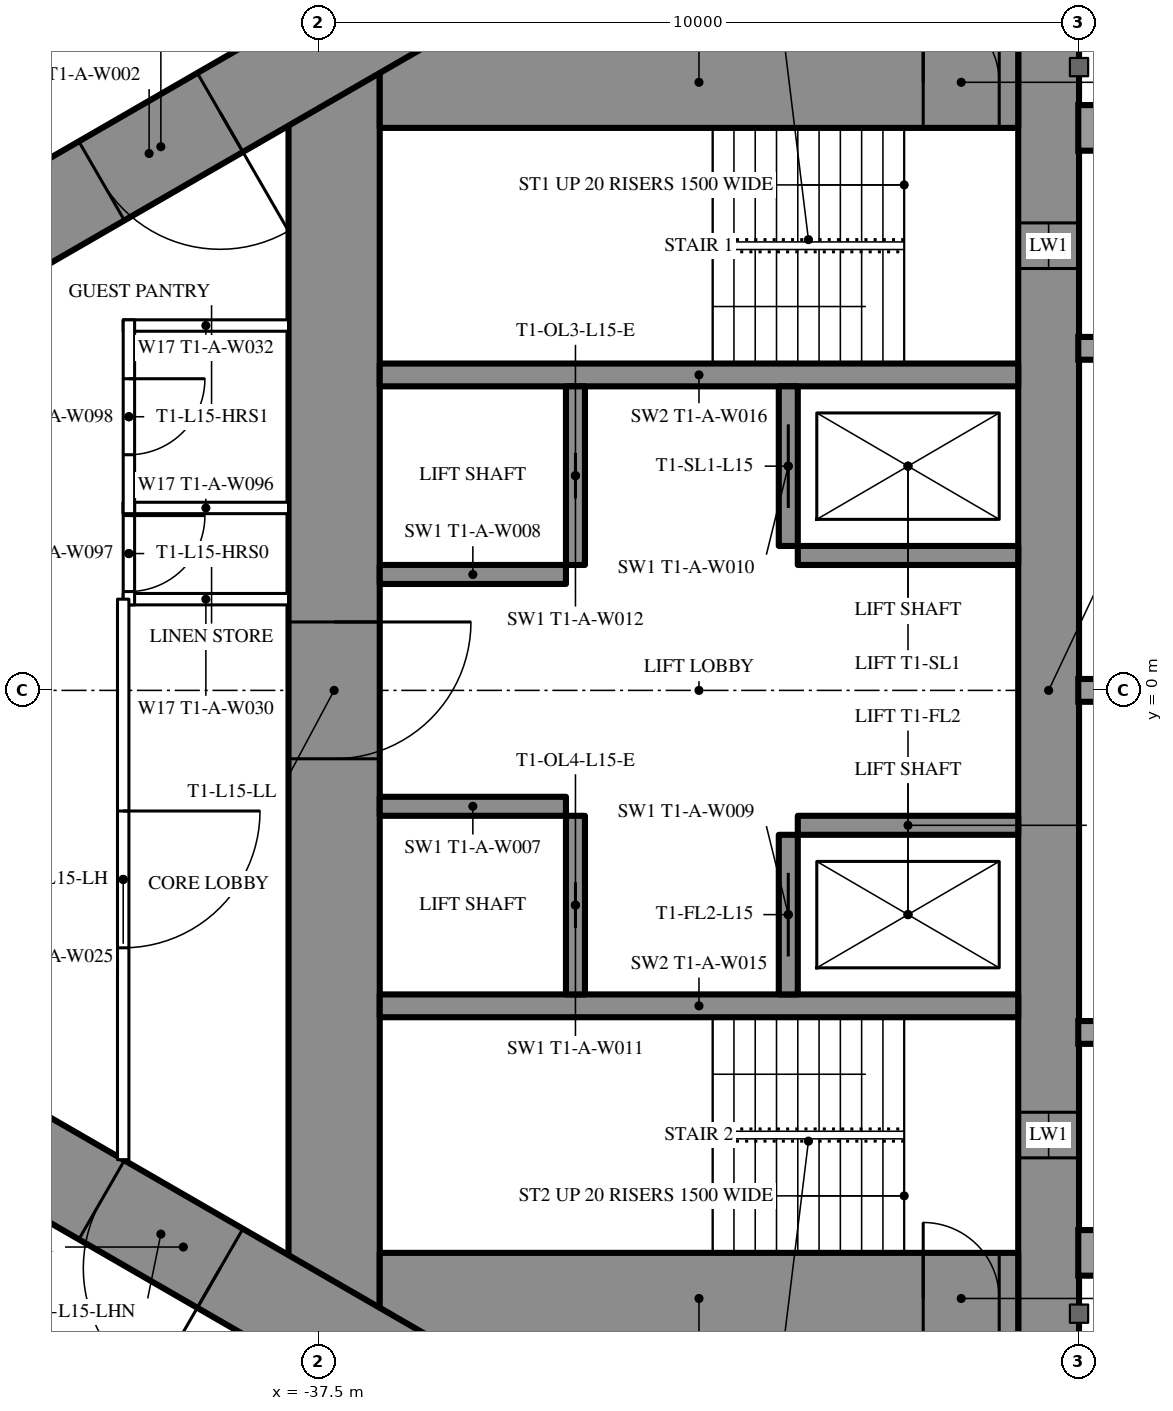
"""IFC4 building model, lengths in metres.
Left out: names, types, materials, properties, quantities, classifications, styles, units other than length and angle.
Written with IfcOpenShell. Run it as: python <this file> out.ifc"""

import sys

from ifc_helpers import new_model, si_unit, direction, frame, frame_2d, origin, place, context, subcontext, project, spatial, rectangle, extrude, element, fill, save


model = new_model("IFC4")
c1 = context("Model", 3, precision=1e-05, world=origin(), true_north=direction((0.0, 1.0)))
c2 = subcontext(c1, "Body", "Model", "MODEL_VIEW")
j1 = project(units=[si_unit("LENGTHUNIT", "METRE"), si_unit("PLANEANGLEUNIT", "RADIAN")], contexts=[c1])
p1 = place(None, origin())
s1 = spatial("IfcSite", under=j1, at=p1, CompositionType="ELEMENT")
p2 = place(p1, origin())
s2 = spatial("IfcBuilding", under=s1, at=p2, CompositionType="ELEMENT")
p3 = place(p2, frame((0.0, 0.0, 60.0)))
s3 = spatial("IfcBuildingStorey", under=s2, at=p3, CompositionType="ELEMENT", Elevation=60.0)
p4 = place(p3, frame((-27.9, 8.6, 0.0), z_axis=(0.0, 0.0, 1.0), x_axis=(0.0, -1.0, 0.0)))
e1 = element("IfcWall", 1, at=p4, inside=s3, PredefinedType="SHEAR", context=c2, shape_type="SweptSolid", body=[
    extrude(rectangle(XDim=17.2, YDim=0.8, at=frame_2d((8.6, 0.0))), origin(), (0.0, 0.0, 1.0), 3.5),
])
p5 = place(p4, frame((2.45, 0.0, 0.6)))
e2 = element("IfcOpeningElement", 2, at=p5, cuts=e1, PredefinedType="OPENING", context=c2, shape_type="SweptSolid", body=[
    extrude(rectangle(XDim=0.6, YDim=2.1, at=frame_2d((0.3, 1.05))), frame((0.0, 0.41, 0.0), z_axis=(0.0, -1.0, 0.0), x_axis=(1.0, 0.0, 0.0)), (0.0, 0.0, 1.0), 0.82),
])
p6 = place(p4, frame((14.15, 0.0, 0.6)))
e3 = element("IfcOpeningElement", 3, at=p6, cuts=e1, PredefinedType="OPENING", context=c2, shape_type="SweptSolid", body=[
    extrude(rectangle(XDim=0.6, YDim=2.1, at=frame_2d((0.3, 1.05))), frame((0.0, 0.41, 0.0), z_axis=(0.0, -1.0, 0.0), x_axis=(1.0, 0.0, 0.0)), (0.0, 0.0, 1.0), 0.82),
])
p7 = place(p3, frame((-37.3, 8.6, 0.0), z_axis=(0.0, 0.0, 1.0), x_axis=(0.0, -1.0, 0.0)))
e4 = element("IfcWall", 4, at=p7, inside=s3, PredefinedType="SHEAR", context=c2, shape_type="SweptSolid", body=[
    extrude(rectangle(XDim=17.2, YDim=1.2, at=frame_2d((8.6, 0.0))), origin(), (0.0, 0.0, 1.0), 3.5),
])
p8 = place(p7, frame((7.7, 0.0, 0.0)))
e5 = element("IfcOpeningElement", 5, at=p8, cuts=e4, PredefinedType="OPENING", context=c2, shape_type="SweptSolid", body=[
    extrude(rectangle(XDim=1.8, YDim=2.2, at=frame_2d((0.9, 1.1))), frame((0.0, 0.61, 0.0), z_axis=(0.0, -1.0, 0.0), x_axis=(1.0, 0.0, 0.0)), (0.0, 0.0, 1.0), 1.22),
])
p9 = place(p3, frame((-28.3, 8.0, 0.0), z_axis=(0.0, 0.0, 1.0), x_axis=(-1.0, 0.0, 0.0)))
e6 = element("IfcWall", 6, at=p9, inside=s3, PredefinedType="SHEAR", context=c2, shape_type="SweptSolid", body=[
    extrude(rectangle(XDim=8.4, YDim=1.2, at=frame_2d((4.2, 0.0))), origin(), (0.0, 0.0, 1.0), 3.5),
])
p10 = place(p9, frame((0.25, 0.0, 0.0)))
e7 = element("IfcOpeningElement", 7, at=p10, cuts=e6, PredefinedType="OPENING", context=c2, shape_type="SweptSolid", body=[
    extrude(rectangle(XDim=1.0, YDim=2.2, at=frame_2d((0.5, 1.1))), frame((0.0, 0.61, 0.0), z_axis=(0.0, -1.0, 0.0), x_axis=(1.0, 0.0, 0.0)), (0.0, 0.0, 1.0), 1.22),
])
p11 = place(p3, frame((-28.3, -8.0, 0.0), z_axis=(0.0, 0.0, 1.0), x_axis=(-1.0, 0.0, 0.0)))
e8 = element("IfcWall", 8, at=p11, inside=s3, PredefinedType="SHEAR", context=c2, shape_type="SweptSolid", body=[
    extrude(rectangle(XDim=8.4, YDim=1.2, at=frame_2d((4.2, 0.0))), origin(), (0.0, 0.0, 1.0), 3.5),
])
p12 = place(p11, frame((0.25, 0.0, 0.0)))
e9 = element("IfcOpeningElement", 9, at=p12, cuts=e8, PredefinedType="OPENING", context=c2, shape_type="SweptSolid", body=[
    extrude(rectangle(XDim=1.0, YDim=2.2, at=frame_2d((0.5, 1.1))), frame((0.0, 0.61, 0.0), z_axis=(0.0, -1.0, 0.0), x_axis=(1.0, 0.0, 0.0)), (0.0, 0.0, 1.0), 1.22),
])
for number, where, z_axis, x_axis in (
    (10, (-28.3, 4.15, 0.0), (0.0, 0.0, 1.0), (-1.0, 0.0, 0.0)),
    (11, (-28.3, -4.15, 0.0), (0.0, 0.0, 1.0), (-1.0, 0.0, 0.0)),
):
    element("IfcWall", number, at=place(p3, frame(where, z_axis=z_axis, x_axis=x_axis)), inside=s3, PredefinedType="SHEAR", context=c2, shape_type="SweptSolid", body=[
        extrude(rectangle(XDim=8.4, YDim=0.3, at=frame_2d((4.2, 0.0))), origin(), (0.0, 0.0, 1.0), 3.5),
    ])
p13 = place(p3, frame((-31.325, 4.0, 0.0), z_axis=(0.0, 0.0, 1.0), x_axis=(0.0, -1.0, 0.0)))
e12 = element("IfcWall", 12, at=p13, inside=s3, PredefinedType="SHEAR", context=c2, shape_type="SweptSolid", body=[
    extrude(rectangle(XDim=2.1, YDim=0.25, at=frame_2d((1.05, 0.0))), origin(), (0.0, 0.0, 1.0), 3.5),
])
p14 = place(p13, frame((0.5, 0.0, 0.0)))
e13 = element("IfcOpeningElement", 13, at=p14, cuts=e12, PredefinedType="OPENING", context=c2, shape_type="SweptSolid", body=[
    extrude(rectangle(XDim=1.1, YDim=2.2, at=frame_2d((0.55, 1.1))), frame((0.0, 0.135, 0.0), z_axis=(0.0, -1.0, 0.0), x_axis=(1.0, 0.0, 0.0)), (0.0, 0.0, 1.0), 0.27),
])
p15 = place(p3, frame((-34.125, 4.0, 0.0), z_axis=(0.0, 0.0, 1.0), x_axis=(0.0, -1.0, 0.0)))
e14 = element("IfcWall", 14, at=p15, inside=s3, PredefinedType="SHEAR", context=c2, shape_type="SweptSolid", body=[
    extrude(rectangle(XDim=2.35, YDim=0.25, at=frame_2d((1.175, 0.0))), origin(), (0.0, 0.0, 1.0), 3.5),
])
p16 = place(p15, frame((0.875, 0.0, 0.0)))
e15 = element("IfcOpeningElement", 15, at=p16, cuts=e14, PredefinedType="OPENING", context=c2, shape_type="SweptSolid", body=[
    extrude(rectangle(XDim=0.6, YDim=2.0, at=frame_2d((0.3, 1.0))), frame((0.0, 0.135, 0.0), z_axis=(0.0, -1.0, 0.0), x_axis=(1.0, 0.0, 0.0)), (0.0, 0.0, 1.0), 0.27),
])
p17 = place(p3, frame((-28.3, 1.775, 0.0), z_axis=(0.0, 0.0, 1.0), x_axis=(-1.0, 0.0, 0.0)))
e16 = element("IfcWall", 16, at=p17, inside=s3, PredefinedType="SHEAR", context=c2, shape_type="SweptSolid", body=[
    extrude(rectangle(XDim=2.9, YDim=0.25, at=frame_2d((1.45, 0.0))), origin(), (0.0, 0.0, 1.0), 3.5),
])
p18 = place(p3, frame((-34.25, 1.525, 0.0), z_axis=(0.0, 0.0, 1.0), x_axis=(-1.0, 0.0, 0.0)))
e17 = element("IfcWall", 17, at=p18, inside=s3, PredefinedType="SHEAR", context=c2, shape_type="SweptSolid", body=[
    extrude(rectangle(XDim=2.45, YDim=0.25, at=frame_2d((1.225, 0.0))), origin(), (0.0, 0.0, 1.0), 3.5),
])
p19 = place(p3, frame((-31.325, -1.9, 0.0), z_axis=(0.0, 0.0, 1.0), x_axis=(0.0, -1.0, 0.0)))
e18 = element("IfcWall", 18, at=p19, inside=s3, PredefinedType="SHEAR", context=c2, shape_type="SweptSolid", body=[
    extrude(rectangle(XDim=2.1, YDim=0.25, at=frame_2d((1.05, 0.0))), origin(), (0.0, 0.0, 1.0), 3.5),
])
p20 = place(p19, frame((0.5, 0.0, 0.0)))
e19 = element("IfcOpeningElement", 19, at=p20, cuts=e18, PredefinedType="OPENING", context=c2, shape_type="SweptSolid", body=[
    extrude(rectangle(XDim=1.1, YDim=2.2, at=frame_2d((0.55, 1.1))), frame((0.0, 0.135, 0.0), z_axis=(0.0, -1.0, 0.0), x_axis=(1.0, 0.0, 0.0)), (0.0, 0.0, 1.0), 0.27),
])
p21 = place(p3, frame((-34.125, -1.65, 0.0), z_axis=(0.0, 0.0, 1.0), x_axis=(0.0, -1.0, 0.0)))
e20 = element("IfcWall", 20, at=p21, inside=s3, PredefinedType="SHEAR", context=c2, shape_type="SweptSolid", body=[
    extrude(rectangle(XDim=2.35, YDim=0.25, at=frame_2d((1.175, 0.0))), origin(), (0.0, 0.0, 1.0), 3.5),
])
p22 = place(p21, frame((0.875, 0.0, 0.0)))
e21 = element("IfcOpeningElement", 21, at=p22, cuts=e20, PredefinedType="OPENING", context=c2, shape_type="SweptSolid", body=[
    extrude(rectangle(XDim=0.6, YDim=2.0, at=frame_2d((0.3, 1.0))), frame((0.0, 0.135, 0.0), z_axis=(0.0, -1.0, 0.0), x_axis=(1.0, 0.0, 0.0)), (0.0, 0.0, 1.0), 0.27),
])
p23 = place(p3, frame((-28.3, -1.775, 0.0), z_axis=(0.0, 0.0, 1.0), x_axis=(-1.0, 0.0, 0.0)))
e22 = element("IfcWall", 22, at=p23, inside=s3, PredefinedType="SHEAR", context=c2, shape_type="SweptSolid", body=[
    extrude(rectangle(XDim=2.9, YDim=0.25, at=frame_2d((1.45, 0.0))), origin(), (0.0, 0.0, 1.0), 3.5),
])
p24 = place(p3, frame((-34.25, -1.525, 0.0), z_axis=(0.0, 0.0, 1.0), x_axis=(-1.0, 0.0, 0.0)))
e23 = element("IfcWall", 23, at=p24, inside=s3, PredefinedType="SHEAR", context=c2, shape_type="SweptSolid", body=[
    extrude(rectangle(XDim=2.45, YDim=0.25, at=frame_2d((1.225, 0.0))), origin(), (0.0, 0.0, 1.0), 3.5),
])
p25 = place(p3, frame((-27.2, 14.3, 0.0), z_axis=(0.0, 0.0, 1.0), x_axis=(-0.866026593062, -0.499997940104, 0.0)))
e24 = element("IfcWall", 24, at=p25, inside=s3, PredefinedType="SHEAR", context=c2, shape_type="SweptSolid", body=[
    extrude(rectangle(XDim=28.946, YDim=1.2, at=frame_2d((14.473, 0.0))), origin(), (0.0, 0.0, 1.0), 3.5),
])
p26 = place(p25, frame((4.6, 0.0, 0.0)))
e25 = element("IfcOpeningElement", 25, at=p26, cuts=e24, PredefinedType="OPENING", context=c2, shape_type="SweptSolid", body=[
    extrude(rectangle(XDim=1.0, YDim=2.2, at=frame_2d((0.5, 1.1))), frame((0.0, 0.61, 0.0), z_axis=(0.0, -1.0, 0.0), x_axis=(1.0, 0.0, 0.0)), (0.0, 0.0, 1.0), 1.22),
])
p27 = place(p25, frame((13.395, 0.0, 0.0)))
e26 = element("IfcOpeningElement", 26, at=p27, cuts=e24, PredefinedType="OPENING", context=c2, shape_type="SweptSolid", body=[
    extrude(rectangle(XDim=1.8, YDim=2.2, at=frame_2d((0.9, 1.1))), frame((0.0, 0.61, 0.0), z_axis=(0.0, -1.0, 0.0), x_axis=(1.0, 0.0, 0.0)), (0.0, 0.0, 1.0), 1.22),
])
p28 = place(p3, frame((-27.2, -14.3, 0.0), z_axis=(0.0, 0.0, 1.0), x_axis=(-0.866024021859, 0.500002393557, 0.0)))
e27 = element("IfcWall", 27, at=p28, inside=s3, PredefinedType="SHEAR", context=c2, shape_type="SweptSolid", body=[
    extrude(rectangle(XDim=27.907, YDim=1.2, at=frame_2d((13.954, 0.0))), origin(), (0.0, 0.0, 1.0), 3.5),
])
p29 = place(p28, frame((4.6, 0.0, 0.0)))
e28 = element("IfcOpeningElement", 28, at=p29, cuts=e27, PredefinedType="OPENING", context=c2, shape_type="SweptSolid", body=[
    extrude(rectangle(XDim=1.0, YDim=2.2, at=frame_2d((0.5, 1.1))), frame((0.0, 0.61, 0.0), z_axis=(0.0, -1.0, 0.0), x_axis=(1.0, 0.0, 0.0)), (0.0, 0.0, 1.0), 1.22),
])
p30 = place(p28, frame((13.395, 0.0, 0.0)))
e29 = element("IfcOpeningElement", 29, at=p30, cuts=e27, PredefinedType="OPENING", context=c2, shape_type="SweptSolid", body=[
    extrude(rectangle(XDim=1.8, YDim=2.2, at=frame_2d((0.9, 1.1))), frame((0.0, 0.61, 0.0), z_axis=(0.0, -1.0, 0.0), x_axis=(1.0, 0.0, 0.0)), (0.0, 0.0, 1.0), 1.22),
])
p31 = place(p3, frame((-37.7, 10.894, 0.0), z_axis=(0.0, 0.0, 1.0), x_axis=(-0.866027905338, -0.499995667157, 0.0)))
e30 = element("IfcWall", 30, at=p31, inside=s3, PredefinedType="PARTITIONING", context=c2, shape_type="SweptSolid", body=[
    extrude(rectangle(XDim=21.787, YDim=0.2, at=frame_2d((10.894, 0.0))), origin(), (0.0, 0.0, 1.0), 3.25),
])
p32 = place(p31, frame((20.237, 0.0, 0.0)))
e31 = element("IfcOpeningElement", 31, at=p32, cuts=e30, PredefinedType="OPENING", context=c2, shape_type="SweptSolid", body=[
    extrude(rectangle(XDim=0.95, YDim=2.2, at=frame_2d((0.475, 1.1))), frame((0.0, 0.11, 0.0), z_axis=(0.0, -1.0, 0.0), x_axis=(1.0, 0.0, 0.0)), (0.0, 0.0, 1.0), 0.22),
])
p33 = place(p31, frame((7.73, 0.0, 0.0)))
e32 = element("IfcOpeningElement", 32, at=p33, cuts=e30, PredefinedType="OPENING", context=c2, shape_type="SweptSolid", body=[
    extrude(rectangle(XDim=0.95, YDim=2.2, at=frame_2d((0.475, 1.1))), frame((0.0, 0.11, 0.0), z_axis=(0.0, -1.0, 0.0), x_axis=(1.0, 0.0, 0.0)), (0.0, 0.0, 1.0), 0.22),
])
p34 = place(p3, frame((-36.92, -11.344, 0.0), z_axis=(0.0, 0.0, 1.0), x_axis=(-0.866028313256, 0.499994960614, 0.0)))
e33 = element("IfcWall", 33, at=p34, inside=s3, PredefinedType="PARTITIONING", context=c2, shape_type="SweptSolid", body=[
    extrude(rectangle(XDim=22.568, YDim=0.2, at=frame_2d((11.284, 0.0))), origin(), (0.0, 0.0, 1.0), 3.25),
])
p35 = place(p34, frame((12.68, 0.0, 0.0)))
e34 = element("IfcOpeningElement", 34, at=p35, cuts=e33, PredefinedType="OPENING", context=c2, shape_type="SweptSolid", body=[
    extrude(rectangle(XDim=0.95, YDim=2.2, at=frame_2d((0.475, 1.1))), frame((0.0, 0.11, 0.0), z_axis=(0.0, -1.0, 0.0), x_axis=(1.0, 0.0, 0.0)), (0.0, 0.0, 1.0), 0.22),
])
p36 = place(p34, frame((3.35, 0.0, 0.0)))
e35 = element("IfcOpeningElement", 35, at=p36, cuts=e33, PredefinedType="OPENING", context=c2, shape_type="SweptSolid", body=[
    extrude(rectangle(XDim=1.0, YDim=2.2, at=frame_2d((0.5, 1.1))), frame((0.0, 0.11, 0.0), z_axis=(0.0, -1.0, 0.0), x_axis=(1.0, 0.0, 0.0)), (0.0, 0.0, 1.0), 0.22),
])
for number, where, z_axis, x_axis in (
    (36, (-37.9, 1.2, 0.0), (0.0, 0.0, 1.0), (-1.0, 0.0, 0.0)),
    (37, (-37.9, 2.4, 0.0), (0.0, 0.0, 1.0), (-1.0, 0.0, 0.0)),
    (38, (-37.9, 4.8, 0.0), (0.0, 0.0, 1.0), (-1.0, 0.0, 0.0)),
):
    element("IfcWall", number, at=place(p3, frame(where, z_axis=z_axis, x_axis=x_axis)), inside=s3, PredefinedType="PARTITIONING", context=c2, shape_type="SweptSolid", body=[
        extrude(rectangle(XDim=2.175, YDim=0.15, at=frame_2d((1.087, 0.0))), origin(), (0.0, 0.0, 1.0), 3.25),
    ])
p37 = place(p3, frame((-40.0, 2.475, 0.0), z_axis=(0.0, 0.0, 1.0), x_axis=(0.0, -1.0, 0.0)))
e39 = element("IfcWall", 39, at=p37, inside=s3, PredefinedType="PARTITIONING", context=c2, shape_type="SweptSolid", body=[
    extrude(rectangle(XDim=1.35, YDim=0.15, at=frame_2d((0.675, 0.0))), origin(), (0.0, 0.0, 1.0), 3.25),
])
p38 = place(p37, frame((0.175, 0.0, 0.0)))
e40 = element("IfcOpeningElement", 40, at=p38, cuts=e39, PredefinedType="OPENING", context=c2, shape_type="SweptSolid", body=[
    extrude(rectangle(XDim=1.0, YDim=2.2, at=frame_2d((0.5, 1.1))), frame((0.0, 0.085, 0.0), z_axis=(0.0, -1.0, 0.0), x_axis=(1.0, 0.0, 0.0)), (0.0, 0.0, 1.0), 0.17),
])
p39 = place(p3, frame((-40.0, 4.875, 0.0), z_axis=(0.0, 0.0, 1.0), x_axis=(0.0, -1.0, 0.0)))
e41 = element("IfcWall", 41, at=p39, inside=s3, PredefinedType="PARTITIONING", context=c2, shape_type="SweptSolid", body=[
    extrude(rectangle(XDim=2.55, YDim=0.15, at=frame_2d((1.275, 0.0))), origin(), (0.0, 0.0, 1.0), 3.25),
])
p40 = place(p39, frame((0.775, 0.0, 0.0)))
e42 = element("IfcOpeningElement", 42, at=p40, cuts=e41, PredefinedType="OPENING", context=c2, shape_type="SweptSolid", body=[
    extrude(rectangle(XDim=1.0, YDim=2.2, at=frame_2d((0.5, 1.1))), frame((0.0, 0.085, 0.0), z_axis=(0.0, -1.0, 0.0), x_axis=(1.0, 0.0, 0.0)), (0.0, 0.0, 1.0), 0.17),
])
p41 = place(p3, frame((-40.075, 1.2, 0.0), z_axis=(0.0, 0.0, 1.0), x_axis=(0.0, -1.0, 0.0)))
e43 = element("IfcWall", 43, at=p41, inside=s3, PredefinedType="PARTITIONING", context=c2, shape_type="SweptSolid", body=[
    extrude(rectangle(XDim=7.374, YDim=0.15, at=frame_2d((3.687, 0.0))), origin(), (0.0, 0.0, 1.0), 3.25),
])
p42 = place(p41, frame((2.787, 0.0, 0.0)))
e44 = element("IfcOpeningElement", 44, at=p42, cuts=e43, PredefinedType="OPENING", context=c2, shape_type="SweptSolid", body=[
    extrude(rectangle(XDim=1.8, YDim=2.2, at=frame_2d((0.9, 1.1))), frame((0.0, 0.085, 0.0), z_axis=(0.0, -1.0, 0.0), x_axis=(1.0, 0.0, 0.0)), (0.0, 0.0, 1.0), 0.17),
])
p43 = place(p38, origin())
e45 = element("IfcDoor", 45, at=p43, inside=s3, OperationType="SINGLE_SWING_LEFT", PredefinedType="DOOR", context=c2, shape_type="SweptSolid", body=[
    extrude(rectangle(XDim=1.0, YDim=2.2, at=frame_2d((0.5, 1.1))), frame((0.0, 0.025, 0.0), z_axis=(0.0, -1.0, 0.0), x_axis=(1.0, 0.0, 0.0)), (0.0, 0.0, 1.0), 0.05),
])
fill(e40, e45)
p44 = place(p40, origin())
e46 = element("IfcDoor", 46, at=p44, inside=s3, OperationType="SINGLE_SWING_LEFT", PredefinedType="DOOR", context=c2, shape_type="SweptSolid", body=[
    extrude(rectangle(XDim=1.0, YDim=2.2, at=frame_2d((0.5, 1.1))), frame((0.0, 0.025, 0.0), z_axis=(0.0, -1.0, 0.0), x_axis=(1.0, 0.0, 0.0)), (0.0, 0.0, 1.0), 0.05),
])
fill(e42, e46)
p45 = place(p42, origin())
e47 = element("IfcDoor", 47, at=p45, inside=s3, OperationType="DOUBLE_DOOR_SINGLE_SWING", PredefinedType="DOOR", context=c2, shape_type="SweptSolid", body=[
    extrude(rectangle(XDim=1.8, YDim=2.2, at=frame_2d((0.9, 1.1))), frame((0.0, 0.025, 0.0), z_axis=(0.0, -1.0, 0.0), x_axis=(1.0, 0.0, 0.0)), (0.0, 0.0, 1.0), 0.05),
])
fill(e44, e47)
p46 = place(p27, origin())
e48 = element("IfcDoor", 48, at=p46, inside=s3, OperationType="DOUBLE_DOOR_SINGLE_SWING", PredefinedType="DOOR", context=c2, shape_type="SweptSolid", body=[
    extrude(rectangle(XDim=1.8, YDim=2.2, at=frame_2d((0.9, 1.1))), frame((0.0, 0.025, 0.0), z_axis=(0.0, -1.0, 0.0), x_axis=(1.0, 0.0, 0.0)), (0.0, 0.0, 1.0), 0.05),
])
fill(e26, e48)
p47 = place(p30, origin())
e49 = element("IfcDoor", 49, at=p47, inside=s3, OperationType="DOUBLE_DOOR_SINGLE_SWING", PredefinedType="DOOR", context=c2, shape_type="SweptSolid", body=[
    extrude(rectangle(XDim=1.8, YDim=2.2, at=frame_2d((0.9, 1.1))), frame((0.0, 0.025, 0.0), z_axis=(0.0, -1.0, 0.0), x_axis=(1.0, 0.0, 0.0)), (0.0, 0.0, 1.0), 0.05),
])
fill(e29, e49)
p48 = place(p8, origin())
e50 = element("IfcDoor", 50, at=p48, inside=s3, OperationType="DOUBLE_DOOR_SINGLE_SWING", PredefinedType="DOOR", context=c2, shape_type="SweptSolid", body=[
    extrude(rectangle(XDim=1.8, YDim=2.2, at=frame_2d((0.9, 1.1))), frame((0.0, 0.025, 0.0), z_axis=(0.0, -1.0, 0.0), x_axis=(1.0, 0.0, 0.0)), (0.0, 0.0, 1.0), 0.05),
])
fill(e5, e50)
p49 = place(p10, origin())
e51 = element("IfcDoor", 51, at=p49, inside=s3, OperationType="SINGLE_SWING_RIGHT", PredefinedType="DOOR", context=c2, shape_type="SweptSolid", body=[
    extrude(rectangle(XDim=1.0, YDim=2.2, at=frame_2d((0.5, 1.1))), frame((0.0, 0.025, 0.0), z_axis=(0.0, -1.0, 0.0), x_axis=(1.0, 0.0, 0.0)), (0.0, 0.0, 1.0), 0.05),
])
fill(e7, e51)
p50 = place(p12, origin())
e52 = element("IfcDoor", 52, at=p50, inside=s3, OperationType="SINGLE_SWING_RIGHT", PredefinedType="DOOR", context=c2, shape_type="SweptSolid", body=[
    extrude(rectangle(XDim=1.0, YDim=2.2, at=frame_2d((0.5, 1.1))), frame((0.0, 0.025, 0.0), z_axis=(0.0, -1.0, 0.0), x_axis=(1.0, 0.0, 0.0)), (0.0, 0.0, 1.0), 0.05),
])
fill(e9, e52)
p51 = place(p14, origin())
e53 = element("IfcDoor", 53, at=p51, inside=s3, OperationType="SLIDING_TO_LEFT", PredefinedType="USERDEFINED", context=c2, shape_type="SweptSolid", body=[
    extrude(rectangle(XDim=1.1, YDim=2.2, at=frame_2d((0.55, 1.1))), frame((0.0, 0.025, 0.0), z_axis=(0.0, -1.0, 0.0), x_axis=(1.0, 0.0, 0.0)), (0.0, 0.0, 1.0), 0.05),
])
fill(e13, e53)
p52 = place(p20, origin())
e54 = element("IfcDoor", 54, at=p52, inside=s3, OperationType="SLIDING_TO_LEFT", PredefinedType="USERDEFINED", context=c2, shape_type="SweptSolid", body=[
    extrude(rectangle(XDim=1.1, YDim=2.2, at=frame_2d((0.55, 1.1))), frame((0.0, 0.025, 0.0), z_axis=(0.0, -1.0, 0.0), x_axis=(1.0, 0.0, 0.0)), (0.0, 0.0, 1.0), 0.05),
])
fill(e19, e54)
p53 = place(p16, origin())
e55 = element("IfcDoor", 55, at=p53, inside=s3, OperationType="SLIDING_TO_LEFT", PredefinedType="DOOR", context=c2, shape_type="SweptSolid", body=[
    extrude(rectangle(XDim=0.6, YDim=2.0, at=frame_2d((0.3, 1.0))), frame((0.0, 0.025, 0.0), z_axis=(0.0, -1.0, 0.0), x_axis=(1.0, 0.0, 0.0)), (0.0, 0.0, 1.0), 0.05),
])
fill(e15, e55)
p54 = place(p22, origin())
e56 = element("IfcDoor", 56, at=p54, inside=s3, OperationType="SLIDING_TO_LEFT", PredefinedType="DOOR", context=c2, shape_type="SweptSolid", body=[
    extrude(rectangle(XDim=0.6, YDim=2.0, at=frame_2d((0.3, 1.0))), frame((0.0, 0.025, 0.0), z_axis=(0.0, -1.0, 0.0), x_axis=(1.0, 0.0, 0.0)), (0.0, 0.0, 1.0), 0.05),
])
fill(e21, e56)
p55 = place(p5, origin())
e57 = element("IfcWindow", 57, at=p55, inside=s3, PartitioningType="SINGLE_PANEL", PredefinedType="WINDOW", context=c2, shape_type="SweptSolid", body=[
    extrude(rectangle(XDim=0.6, YDim=2.1, at=frame_2d((0.3, 1.05))), frame((0.0, 0.03, 0.0), z_axis=(0.0, -1.0, 0.0), x_axis=(1.0, 0.0, 0.0)), (0.0, 0.0, 1.0), 0.06),
])
fill(e2, e57)
p56 = place(p6, origin())
e58 = element("IfcWindow", 58, at=p56, inside=s3, PartitioningType="SINGLE_PANEL", PredefinedType="WINDOW", context=c2, shape_type="SweptSolid", body=[
    extrude(rectangle(XDim=0.6, YDim=2.1, at=frame_2d((0.3, 1.05))), frame((0.0, 0.03, 0.0), z_axis=(0.0, -1.0, 0.0), x_axis=(1.0, 0.0, 0.0)), (0.0, 0.0, 1.0), 0.06),
])
fill(e3, e58)
save(model, sys.argv[1])
